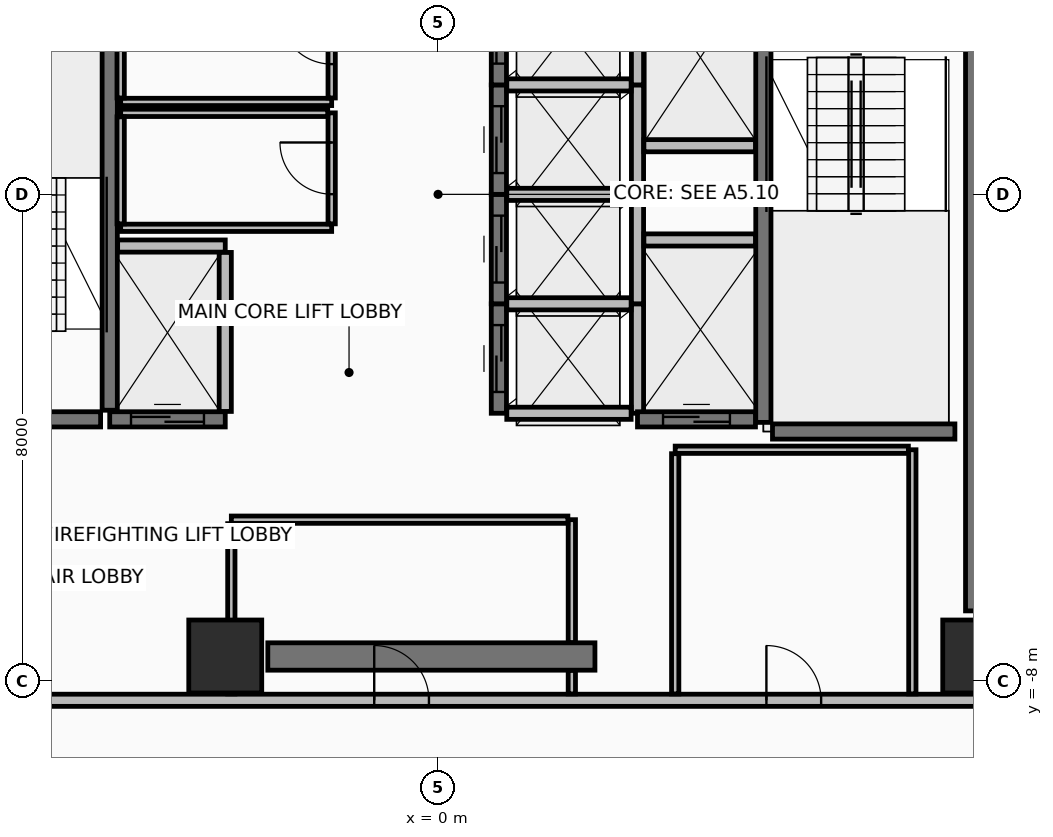
"""IFC4 building model, lengths in metres.
Left out: names, types, materials, properties, quantities, classifications, styles, units other than length and angle.
Written with IfcOpenShell. Run it as: python <this file> out.ifc"""

import sys

from ifc_helpers import new_model, si_unit, direction, frame, frame_2d, origin, origin_2d, place, context, subcontext, project, spatial, rectangle, extrude, element, fill, save


model = new_model("IFC4")
c1 = context("Model", 3, precision=1e-05, world=origin(), true_north=direction((0.0, 1.0)))
c2 = subcontext(c1, "Body", "Model", "MODEL_VIEW")
j1 = project(units=[si_unit("LENGTHUNIT", "METRE"), si_unit("PLANEANGLEUNIT", "RADIAN")], contexts=[c1])
p1 = place(None, origin())
s1 = spatial("IfcSite", under=j1, at=p1, CompositionType="ELEMENT")
p2 = place(p1, origin())
s2 = spatial("IfcBuilding", under=s1, at=p2, CompositionType="ELEMENT")
p3 = place(p2, frame((0.0, 0.0, 170.5)))
s3 = spatial("IfcBuildingStorey", under=s2, at=p3, CompositionType="ELEMENT", Elevation=170.5)
for number, where, z_axis, x_axis in (
    (1, (-3.5, -7.6, 0.0), (0.0, 0.0, 1.0), (1.0, 0.0, 0.0)),
    (2, (8.9, -7.6, 0.0), (0.0, 0.0, 1.0), (1.0, 0.0, 0.0)),
):
    element("IfcColumn", number, at=place(p3, frame(where, z_axis=z_axis, x_axis=x_axis)), inside=s3, PredefinedType="COLUMN", context=c2, shape_type="SweptSolid", body=[
        extrude(rectangle(XDim=1.2, YDim=1.2, at=origin_2d()), origin(), (0.0, 0.0, 1.0), 3.6),
    ])
p4 = place(p3, frame((-2.8, -7.6, 0.0), z_axis=(0.0, 0.0, 1.0), x_axis=(1.0, 0.0, 0.0)))
e3 = element("IfcWall", 3, at=p4, inside=s3, PredefinedType="SHEAR", context=c2, shape_type="SweptSolid", body=[
    extrude(rectangle(XDim=5.38, YDim=0.45, at=frame_2d((2.69, 0.0))), origin(), (0.0, 0.0, 1.0), 3.42),
])
p5 = place(p3, frame((8.9, -6.85, 0.0), z_axis=(0.0, 0.0, 1.0), x_axis=(0.0, 1.0, 0.0)))
e4 = element("IfcWall", 4, at=p5, inside=s3, PredefinedType="SHEAR", context=c2, shape_type="SweptSolid", body=[
    extrude(rectangle(XDim=10.7, YDim=0.45, at=frame_2d((5.35, 0.0))), origin(), (0.0, 0.0, 1.0), 3.42),
])
p6 = place(p3, frame((-9.62, -8.32, 0.0), z_axis=(0.0, 0.0, 1.0), x_axis=(1.0, 0.0, 0.0)))
e5 = element("IfcWall", 5, at=p6, inside=s3, PredefinedType="PARTITIONING", context=c2, shape_type="SweptSolid", body=[
    extrude(rectangle(XDim=19.24, YDim=0.2, at=frame_2d((9.62, 0.0))), origin(), (0.0, 0.0, 1.0), 2.865),
])
p7 = place(p6, frame((8.57, 0.0, 0.0)))
e6 = element("IfcOpeningElement", 6, at=p7, cuts=e5, PredefinedType="OPENING", context=c2, shape_type="SweptSolid", body=[
    extrude(rectangle(XDim=0.9, YDim=2.1, at=frame_2d((0.45, 1.05))), frame((0.0, 0.11, 0.0), z_axis=(0.0, -1.0, 0.0), x_axis=(1.0, 0.0, 0.0)), (0.0, 0.0, 1.0), 0.22),
])
p8 = place(p6, frame((15.02, 0.0, 0.0)))
e7 = element("IfcOpeningElement", 7, at=p8, cuts=e5, PredefinedType="OPENING", context=c2, shape_type="SweptSolid", body=[
    extrude(rectangle(XDim=0.9, YDim=2.1, at=frame_2d((0.45, 1.05))), frame((0.0, 0.11, 0.0), z_axis=(0.0, -1.0, 0.0), x_axis=(1.0, 0.0, 0.0)), (0.0, 0.0, 1.0), 0.22),
])
p9 = place(p3, frame((-5.4, -3.55, 0.0), z_axis=(0.0, 0.0, 1.0), x_axis=(0.0, 1.0, 0.0)))
e8 = element("IfcWall", 8, at=p9, inside=s3, PredefinedType="SHEAR", context=c2, shape_type="SweptSolid", body=[
    extrude(rectangle(XDim=7.3, YDim=0.25, at=frame_2d((3.65, 0.0))), origin(), (0.0, 0.0, 1.0), 3.42),
])
p10 = place(p3, frame((-8.5, -3.7, 0.0), z_axis=(0.0, 0.0, 1.0), x_axis=(1.0, 0.0, 0.0)))
e9 = element("IfcWall", 9, at=p10, inside=s3, PredefinedType="SHEAR", context=c2, shape_type="SweptSolid", body=[
    extrude(rectangle(XDim=2.95, YDim=0.25, at=frame_2d((1.475, 0.0))), origin(), (0.0, 0.0, 1.0), 3.42),
])
p11 = place(p10, frame((0.9, 0.0, 0.0)))
e10 = element("IfcOpeningElement", 10, at=p11, cuts=e9, PredefinedType="OPENING", context=c2, shape_type="SweptSolid", body=[
    extrude(rectangle(XDim=1.1, YDim=2.15, at=frame_2d((0.55, 1.075))), frame((0.0, 0.135, 0.0), z_axis=(0.0, -1.0, 0.0), x_axis=(1.0, 0.0, 0.0)), (0.0, 0.0, 1.0), 0.27),
])
p12 = place(p3, frame((5.35, -3.75, 0.0), z_axis=(0.0, 0.0, 1.0), x_axis=(0.0, 1.0, 0.0)))
e11 = element("IfcWall", 11, at=p12, inside=s3, PredefinedType="SHEAR", context=c2, shape_type="SweptSolid", body=[
    extrude(rectangle(XDim=7.3, YDim=0.25, at=frame_2d((3.65, 0.0))), origin(), (0.0, 0.0, 1.0), 3.42),
])
p13 = place(p3, frame((5.5, -3.9, 0.0), z_axis=(0.0, 0.0, 1.0), x_axis=(1.0, 0.0, 0.0)))
e12 = element("IfcWall", 12, at=p13, inside=s3, PredefinedType="SHEAR", context=c2, shape_type="SweptSolid", body=[
    extrude(rectangle(XDim=3.0, YDim=0.25, at=frame_2d((1.5, 0.0))), origin(), (0.0, 0.0, 1.0), 3.42),
])
p14 = place(p3, frame((1.0, -3.6, 0.0), z_axis=(0.0, 0.0, 1.0), x_axis=(0.0, 1.0, 0.0)))
e13 = element("IfcWall", 13, at=p14, inside=s3, PredefinedType="SHEAR", context=c2, shape_type="SweptSolid", body=[
    extrude(rectangle(XDim=1.8, YDim=0.25, at=frame_2d((0.9, 0.0))), origin(), (0.0, 0.0, 1.0), 3.42),
])
p15 = place(p14, frame((0.35, 0.0, 0.0)))
e14 = element("IfcOpeningElement", 14, at=p15, cuts=e13, PredefinedType="OPENING", context=c2, shape_type="SweptSolid", body=[
    extrude(rectangle(XDim=1.1, YDim=2.2, at=frame_2d((0.55, 1.1))), frame((0.0, 0.135, 0.0), z_axis=(0.0, -1.0, 0.0), x_axis=(1.0, 0.0, 0.0)), (0.0, 0.0, 1.0), 0.27),
])
p16 = place(p3, frame((3.28, -3.6, 0.0), z_axis=(0.0, 0.0, 1.0), x_axis=(0.0, 1.0, 0.0)))
e15 = element("IfcWall", 15, at=p16, inside=s3, PredefinedType="PARTITIONING", context=c2, shape_type="SweptSolid", body=[
    extrude(rectangle(XDim=1.8, YDim=0.2, at=frame_2d((0.9, 0.0))), origin(), (0.0, 0.0, 1.0), 3.42),
])
for number, where, z_axis, x_axis in (
    (16, (1.13, -3.6, 0.0), (0.0, 0.0, 1.0), (1.0, 0.0, 0.0)),
    (17, (1.13, -1.8, 0.0), (0.0, 0.0, 1.0), (1.0, 0.0, 0.0)),
):
    element("IfcWall", number, at=place(p3, frame(where, z_axis=z_axis, x_axis=x_axis)), inside=s3, PredefinedType="PARTITIONING", context=c2, shape_type="SweptSolid", body=[
        extrude(rectangle(XDim=2.045, YDim=0.2, at=frame_2d((1.022, 0.0))), origin(), (0.0, 0.0, 1.0), 3.42),
    ])
p17 = place(p3, frame((1.0, -1.8, 0.0), z_axis=(0.0, 0.0, 1.0), x_axis=(0.0, 1.0, 0.0)))
e18 = element("IfcWall", 18, at=p17, inside=s3, PredefinedType="SHEAR", context=c2, shape_type="SweptSolid", body=[
    extrude(rectangle(XDim=1.8, YDim=0.25, at=frame_2d((0.9, 0.0))), origin(), (0.0, 0.0, 1.0), 3.42),
])
p18 = place(p17, frame((0.35, 0.0, 0.0)))
e19 = element("IfcOpeningElement", 19, at=p18, cuts=e18, PredefinedType="OPENING", context=c2, shape_type="SweptSolid", body=[
    extrude(rectangle(XDim=1.1, YDim=2.2, at=frame_2d((0.55, 1.1))), frame((0.0, 0.135, 0.0), z_axis=(0.0, -1.0, 0.0), x_axis=(1.0, 0.0, 0.0)), (0.0, 0.0, 1.0), 0.27),
])
p19 = place(p3, frame((3.28, -1.8, 0.0), z_axis=(0.0, 0.0, 1.0), x_axis=(0.0, 1.0, 0.0)))
e20 = element("IfcWall", 20, at=p19, inside=s3, PredefinedType="PARTITIONING", context=c2, shape_type="SweptSolid", body=[
    extrude(rectangle(XDim=1.8, YDim=0.2, at=frame_2d((0.9, 0.0))), origin(), (0.0, 0.0, 1.0), 3.42),
])
p20 = place(p3, frame((1.13, 0.0, 0.0), z_axis=(0.0, 0.0, 1.0), x_axis=(1.0, 0.0, 0.0)))
e21 = element("IfcWall", 21, at=p20, inside=s3, PredefinedType="PARTITIONING", context=c2, shape_type="SweptSolid", body=[
    extrude(rectangle(XDim=2.045, YDim=0.2, at=frame_2d((1.022, 0.0))), origin(), (0.0, 0.0, 1.0), 3.42),
])
p21 = place(p3, frame((1.0, 0.0, 0.0), z_axis=(0.0, 0.0, 1.0), x_axis=(0.0, 1.0, 0.0)))
e22 = element("IfcWall", 22, at=p21, inside=s3, PredefinedType="SHEAR", context=c2, shape_type="SweptSolid", body=[
    extrude(rectangle(XDim=1.8, YDim=0.25, at=frame_2d((0.9, 0.0))), origin(), (0.0, 0.0, 1.0), 3.42),
])
p22 = place(p21, frame((0.35, 0.0, 0.0)))
e23 = element("IfcOpeningElement", 23, at=p22, cuts=e22, PredefinedType="OPENING", context=c2, shape_type="SweptSolid", body=[
    extrude(rectangle(XDim=1.1, YDim=2.2, at=frame_2d((0.55, 1.1))), frame((0.0, 0.135, 0.0), z_axis=(0.0, -1.0, 0.0), x_axis=(1.0, 0.0, 0.0)), (0.0, 0.0, 1.0), 0.27),
])
p23 = place(p3, frame((3.28, 0.0, 0.0), z_axis=(0.0, 0.0, 1.0), x_axis=(0.0, 1.0, 0.0)))
e24 = element("IfcWall", 24, at=p23, inside=s3, PredefinedType="PARTITIONING", context=c2, shape_type="SweptSolid", body=[
    extrude(rectangle(XDim=1.8, YDim=0.2, at=frame_2d((0.9, 0.0))), origin(), (0.0, 0.0, 1.0), 3.42),
])
p24 = place(p3, frame((1.13, 1.8, 0.0), z_axis=(0.0, 0.0, 1.0), x_axis=(1.0, 0.0, 0.0)))
e25 = element("IfcWall", 25, at=p24, inside=s3, PredefinedType="PARTITIONING", context=c2, shape_type="SweptSolid", body=[
    extrude(rectangle(XDim=2.045, YDim=0.2, at=frame_2d((1.022, 0.0))), origin(), (0.0, 0.0, 1.0), 3.42),
])
p25 = place(p3, frame((1.0, 1.8, 0.0), z_axis=(0.0, 0.0, 1.0), x_axis=(0.0, 1.0, 0.0)))
e26 = element("IfcWall", 26, at=p25, inside=s3, PredefinedType="SHEAR", context=c2, shape_type="SweptSolid", body=[
    extrude(rectangle(XDim=1.8, YDim=0.25, at=frame_2d((0.9, 0.0))), origin(), (0.0, 0.0, 1.0), 3.42),
])
p26 = place(p25, frame((0.35, 0.0, 0.0)))
e27 = element("IfcOpeningElement", 27, at=p26, cuts=e26, PredefinedType="OPENING", context=c2, shape_type="SweptSolid", body=[
    extrude(rectangle(XDim=1.1, YDim=2.2, at=frame_2d((0.55, 1.1))), frame((0.0, 0.135, 0.0), z_axis=(0.0, -1.0, 0.0), x_axis=(1.0, 0.0, 0.0)), (0.0, 0.0, 1.0), 0.27),
])
p27 = place(p3, frame((3.28, 1.8, 0.0), z_axis=(0.0, 0.0, 1.0), x_axis=(0.0, 1.0, 0.0)))
e28 = element("IfcWall", 28, at=p27, inside=s3, PredefinedType="PARTITIONING", context=c2, shape_type="SweptSolid", body=[
    extrude(rectangle(XDim=1.8, YDim=0.2, at=frame_2d((0.9, 0.0))), origin(), (0.0, 0.0, 1.0), 3.42),
])
p28 = place(p3, frame((-5.4, -3.7, 0.0), z_axis=(0.0, 0.0, 1.0), x_axis=(1.0, 0.0, 0.0)))
e29 = element("IfcWall", 29, at=p28, inside=s3, PredefinedType="SHEAR", context=c2, shape_type="SweptSolid", body=[
    extrude(rectangle(XDim=1.9, YDim=0.25, at=frame_2d((0.95, 0.0))), origin(), (0.0, 0.0, 1.0), 3.42),
])
p29 = place(p28, frame((0.35, 0.0, 0.0)))
e30 = element("IfcOpeningElement", 30, at=p29, cuts=e29, PredefinedType="OPENING", context=c2, shape_type="SweptSolid", body=[
    extrude(rectangle(XDim=1.2, YDim=2.2, at=frame_2d((0.6, 1.1))), frame((0.0, 0.135, 0.0), z_axis=(0.0, -1.0, 0.0), x_axis=(1.0, 0.0, 0.0)), (0.0, 0.0, 1.0), 0.27),
])
p30 = place(p3, frame((-5.27, -0.85, 0.0), z_axis=(0.0, 0.0, 1.0), x_axis=(1.0, 0.0, 0.0)))
e31 = element("IfcWall", 31, at=p30, inside=s3, PredefinedType="PARTITIONING", context=c2, shape_type="SweptSolid", body=[
    extrude(rectangle(XDim=1.77, YDim=0.2, at=frame_2d((0.885, 0.0))), origin(), (0.0, 0.0, 1.0), 3.42),
])
p31 = place(p3, frame((-3.5, -3.57, 0.0), z_axis=(0.0, 0.0, 1.0), x_axis=(0.0, 1.0, 0.0)))
e32 = element("IfcWall", 32, at=p31, inside=s3, PredefinedType="PARTITIONING", context=c2, shape_type="SweptSolid", body=[
    extrude(rectangle(XDim=2.615, YDim=0.2, at=frame_2d((1.308, 0.0))), origin(), (0.0, 0.0, 1.0), 3.42),
])
p32 = place(p3, frame((3.385, 0.8, 0.0), z_axis=(0.0, 0.0, 1.0), x_axis=(1.0, 0.0, 0.0)))
e33 = element("IfcWall", 33, at=p32, inside=s3, PredefinedType="PARTITIONING", context=c2, shape_type="SweptSolid", body=[
    extrude(rectangle(XDim=1.835, YDim=0.2, at=frame_2d((0.917, 0.0))), origin(), (0.0, 0.0, 1.0), 3.42),
])
p33 = place(p3, frame((3.28, -3.7, 0.0), z_axis=(0.0, 0.0, 1.0), x_axis=(1.0, 0.0, 0.0)))
e34 = element("IfcWall", 34, at=p33, inside=s3, PredefinedType="SHEAR", context=c2, shape_type="SweptSolid", body=[
    extrude(rectangle(XDim=1.94, YDim=0.25, at=frame_2d((0.97, 0.0))), origin(), (0.0, 0.0, 1.0), 3.42),
])
p34 = place(p33, frame((0.42, 0.0, 0.0)))
e35 = element("IfcOpeningElement", 35, at=p34, cuts=e34, PredefinedType="OPENING", context=c2, shape_type="SweptSolid", body=[
    extrude(rectangle(XDim=1.1, YDim=2.2, at=frame_2d((0.55, 1.1))), frame((0.0, 0.135, 0.0), z_axis=(0.0, -1.0, 0.0), x_axis=(1.0, 0.0, 0.0)), (0.0, 0.0, 1.0), 0.27),
])
p35 = place(p3, frame((3.385, -0.75, 0.0), z_axis=(0.0, 0.0, 1.0), x_axis=(1.0, 0.0, 0.0)))
e36 = element("IfcWall", 36, at=p35, inside=s3, PredefinedType="PARTITIONING", context=c2, shape_type="SweptSolid", body=[
    extrude(rectangle(XDim=1.835, YDim=0.2, at=frame_2d((0.917, 0.0))), origin(), (0.0, 0.0, 1.0), 3.42),
])
p36 = place(p3, frame((-5.22, 1.52, 0.0), z_axis=(0.0, 0.0, 1.0), x_axis=(1.0, 0.0, 0.0)))
e37 = element("IfcWall", 37, at=p36, inside=s3, PredefinedType="PARTITIONING", context=c2, shape_type="SweptSolid", body=[
    extrude(rectangle(XDim=3.47, YDim=0.12, at=frame_2d((1.735, 0.0))), origin(), (0.0, 0.0, 1.0), 3.42),
])
p37 = place(p3, frame((-1.75, 1.585, 0.0), z_axis=(0.0, 0.0, 1.0), x_axis=(0.0, 1.0, 0.0)))
e38 = element("IfcWall", 38, at=p37, inside=s3, PredefinedType="PARTITIONING", context=c2, shape_type="SweptSolid", body=[
    extrude(rectangle(XDim=1.965, YDim=0.12, at=frame_2d((0.982, 0.0))), origin(), (0.0, 0.0, 1.0), 3.42),
])
p38 = place(p37, frame((0.557, 0.0, 0.0)))
e39 = element("IfcOpeningElement", 39, at=p38, cuts=e38, PredefinedType="OPENING", context=c2, shape_type="SweptSolid", body=[
    extrude(rectangle(XDim=0.85, YDim=2.1, at=frame_2d((0.425, 1.05))), frame((0.0, 0.07, 0.0), z_axis=(0.0, -1.0, 0.0), x_axis=(1.0, 0.0, 0.0)), (0.0, 0.0, 1.0), 0.14),
])
p39 = place(p3, frame((-5.22, 3.485, 0.0), z_axis=(0.0, 0.0, 1.0), x_axis=(0.0, -1.0, 0.0)))
e40 = element("IfcWall", 40, at=p39, inside=s3, PredefinedType="PARTITIONING", context=c2, shape_type="SweptSolid", body=[
    extrude(rectangle(XDim=1.9, YDim=0.12, at=frame_2d((0.95, 0.0))), origin(), (0.0, 0.0, 1.0), 3.42),
])
p40 = place(p3, frame((-5.22, -0.55, 0.0), z_axis=(0.0, 0.0, 1.0), x_axis=(1.0, 0.0, 0.0)))
e41 = element("IfcWall", 41, at=p40, inside=s3, PredefinedType="PARTITIONING", context=c2, shape_type="SweptSolid", body=[
    extrude(rectangle(XDim=3.47, YDim=0.12, at=frame_2d((1.735, 0.0))), origin(), (0.0, 0.0, 1.0), 3.42),
])
p41 = place(p3, frame((-1.75, -0.485, 0.0), z_axis=(0.0, 0.0, 1.0), x_axis=(0.0, 1.0, 0.0)))
e42 = element("IfcWall", 42, at=p41, inside=s3, PredefinedType="PARTITIONING", context=c2, shape_type="SweptSolid", body=[
    extrude(rectangle(XDim=1.825, YDim=0.12, at=frame_2d((0.913, 0.0))), origin(), (0.0, 0.0, 1.0), 3.42),
])
p42 = place(p41, frame((0.488, 0.0, 0.0)))
e43 = element("IfcOpeningElement", 43, at=p42, cuts=e42, PredefinedType="OPENING", context=c2, shape_type="SweptSolid", body=[
    extrude(rectangle(XDim=0.85, YDim=2.1, at=frame_2d((0.425, 1.05))), frame((0.0, 0.07, 0.0), z_axis=(0.0, -1.0, 0.0), x_axis=(1.0, 0.0, 0.0)), (0.0, 0.0, 1.0), 0.14),
])
p43 = place(p3, frame((-1.815, 1.34, 0.0), z_axis=(0.0, 0.0, 1.0), x_axis=(-1.0, 0.0, 0.0)))
e44 = element("IfcWall", 44, at=p43, inside=s3, PredefinedType="PARTITIONING", context=c2, shape_type="SweptSolid", body=[
    extrude(rectangle(XDim=3.405, YDim=0.12, at=frame_2d((1.703, 0.0))), origin(), (0.0, 0.0, 1.0), 3.42),
])
p44 = place(p3, frame((-5.22, 1.275, 0.0), z_axis=(0.0, 0.0, 1.0), x_axis=(0.0, -1.0, 0.0)))
e45 = element("IfcWall", 45, at=p44, inside=s3, PredefinedType="PARTITIONING", context=c2, shape_type="SweptSolid", body=[
    extrude(rectangle(XDim=1.76, YDim=0.12, at=frame_2d((0.88, 0.0))), origin(), (0.0, 0.0, 1.0), 3.42),
])
p45 = place(p3, frame((2.2, -8.215, 0.0), z_axis=(0.0, 0.0, 1.0), x_axis=(0.0, 1.0, 0.0)))
e46 = element("IfcWall", 46, at=p45, inside=s3, PredefinedType="PARTITIONING", context=c2, shape_type="SweptSolid", body=[
    extrude(rectangle(XDim=0.385, YDim=0.12, at=frame_2d((0.192, 0.0))), origin(), (0.0, 0.0, 1.0), 2.715),
])
p46 = place(p3, frame((2.2, -7.37, 0.0), z_axis=(0.0, 0.0, 1.0), x_axis=(0.0, 1.0, 0.0)))
e47 = element("IfcWall", 47, at=p46, inside=s3, PredefinedType="PARTITIONING", context=c2, shape_type="SweptSolid", body=[
    extrude(rectangle(XDim=2.02, YDim=0.12, at=frame_2d((1.01, 0.0))), origin(), (0.0, 0.0, 1.0), 2.715),
])
p47 = place(p3, frame((2.135, -5.35, 0.0), z_axis=(0.0, 0.0, 1.0), x_axis=(-1.0, 0.0, 0.0)))
e48 = element("IfcWall", 48, at=p47, inside=s3, PredefinedType="PARTITIONING", context=c2, shape_type="SweptSolid", body=[
    extrude(rectangle(XDim=5.535, YDim=0.12, at=frame_2d((2.768, 0.0))), origin(), (0.0, 0.0, 1.0), 2.715),
])
p48 = place(p3, frame((-3.4, -5.415, 0.0), z_axis=(0.0, 0.0, 1.0), x_axis=(0.0, -1.0, 0.0)))
e49 = element("IfcWall", 49, at=p48, inside=s3, PredefinedType="PARTITIONING", context=c2, shape_type="SweptSolid", body=[
    extrude(rectangle(XDim=2.8, YDim=0.12, at=frame_2d((1.4, 0.0))), origin(), (0.0, 0.0, 1.0), 2.715),
])
p49 = place(p3, frame((7.8, -8.215, 0.0), z_axis=(0.0, 0.0, 1.0), x_axis=(0.0, 1.0, 0.0)))
e50 = element("IfcWall", 50, at=p49, inside=s3, PredefinedType="PARTITIONING", context=c2, shape_type="SweptSolid", body=[
    extrude(rectangle(XDim=4.015, YDim=0.12, at=frame_2d((2.008, 0.0))), origin(), (0.0, 0.0, 1.0), 2.715),
])
p50 = place(p3, frame((7.735, -4.2, 0.0), z_axis=(0.0, 0.0, 1.0), x_axis=(-1.0, 0.0, 0.0)))
e51 = element("IfcWall", 51, at=p50, inside=s3, PredefinedType="PARTITIONING", context=c2, shape_type="SweptSolid", body=[
    extrude(rectangle(XDim=3.835, YDim=0.12, at=frame_2d((1.917, 0.0))), origin(), (0.0, 0.0, 1.0), 3.42),
])
p51 = place(p3, frame((3.9, -4.265, 0.0), z_axis=(0.0, 0.0, 1.0), x_axis=(0.0, -1.0, 0.0)))
e52 = element("IfcWall", 52, at=p51, inside=s3, PredefinedType="PARTITIONING", context=c2, shape_type="SweptSolid", body=[
    extrude(rectangle(XDim=3.95, YDim=0.12, at=frame_2d((1.975, 0.0))), origin(), (0.0, 0.0, 1.0), 2.715),
])
p52 = place(p15, origin())
e53 = element("IfcDoor", 53, at=p52, inside=s3, OperationType="SLIDING_TO_LEFT", PredefinedType="DOOR", context=c2, shape_type="SweptSolid", body=[
    extrude(rectangle(XDim=1.1, YDim=2.2, at=frame_2d((0.55, 1.1))), frame((0.0, 0.025, 0.0), z_axis=(0.0, -1.0, 0.0), x_axis=(1.0, 0.0, 0.0)), (0.0, 0.0, 1.0), 0.05),
])
fill(e14, e53)
p53 = place(p18, origin())
e54 = element("IfcDoor", 54, at=p53, inside=s3, OperationType="SLIDING_TO_LEFT", PredefinedType="DOOR", context=c2, shape_type="SweptSolid", body=[
    extrude(rectangle(XDim=1.1, YDim=2.2, at=frame_2d((0.55, 1.1))), frame((0.0, 0.025, 0.0), z_axis=(0.0, -1.0, 0.0), x_axis=(1.0, 0.0, 0.0)), (0.0, 0.0, 1.0), 0.05),
])
fill(e19, e54)
p54 = place(p22, origin())
e55 = element("IfcDoor", 55, at=p54, inside=s3, OperationType="SLIDING_TO_LEFT", PredefinedType="DOOR", context=c2, shape_type="SweptSolid", body=[
    extrude(rectangle(XDim=1.1, YDim=2.2, at=frame_2d((0.55, 1.1))), frame((0.0, 0.025, 0.0), z_axis=(0.0, -1.0, 0.0), x_axis=(1.0, 0.0, 0.0)), (0.0, 0.0, 1.0), 0.05),
])
fill(e23, e55)
p55 = place(p26, origin())
e56 = element("IfcDoor", 56, at=p55, inside=s3, OperationType="SLIDING_TO_LEFT", PredefinedType="DOOR", context=c2, shape_type="SweptSolid", body=[
    extrude(rectangle(XDim=1.1, YDim=2.2, at=frame_2d((0.55, 1.1))), frame((0.0, 0.025, 0.0), z_axis=(0.0, -1.0, 0.0), x_axis=(1.0, 0.0, 0.0)), (0.0, 0.0, 1.0), 0.05),
])
fill(e27, e56)
p56 = place(p29, origin())
e57 = element("IfcDoor", 57, at=p56, inside=s3, OperationType="SLIDING_TO_RIGHT", PredefinedType="DOOR", context=c2, shape_type="SweptSolid", body=[
    extrude(rectangle(XDim=1.2, YDim=2.2, at=frame_2d((0.6, 1.1))), frame((0.0, 0.025, 0.0), z_axis=(0.0, -1.0, 0.0), x_axis=(1.0, 0.0, 0.0)), (0.0, 0.0, 1.0), 0.05),
])
fill(e30, e57)
p57 = place(p34, origin())
e58 = element("IfcDoor", 58, at=p57, inside=s3, OperationType="SLIDING_TO_LEFT", PredefinedType="DOOR", context=c2, shape_type="SweptSolid", body=[
    extrude(rectangle(XDim=1.1, YDim=2.2, at=frame_2d((0.55, 1.1))), frame((0.0, 0.025, 0.0), z_axis=(0.0, -1.0, 0.0), x_axis=(1.0, 0.0, 0.0)), (0.0, 0.0, 1.0), 0.05),
])
fill(e35, e58)
p58 = place(p38, frame((0.85, 0.0, 0.0), z_axis=(0.0, 0.0, 1.0), x_axis=(-1.0, 0.0, 0.0)))
e59 = element("IfcDoor", 59, at=p58, inside=s3, OperationType="SINGLE_SWING_RIGHT", PredefinedType="DOOR", context=c2, shape_type="SweptSolid", body=[
    extrude(rectangle(XDim=0.85, YDim=2.1, at=frame_2d((0.425, 1.05))), frame((0.0, 0.025, 0.0), z_axis=(0.0, -1.0, 0.0), x_axis=(1.0, 0.0, 0.0)), (0.0, 0.0, 1.0), 0.05),
])
fill(e39, e59)
p59 = place(p42, frame((0.85, 0.0, 0.0), z_axis=(0.0, 0.0, 1.0), x_axis=(-1.0, 0.0, 0.0)))
e60 = element("IfcDoor", 60, at=p59, inside=s3, OperationType="SINGLE_SWING_RIGHT", PredefinedType="DOOR", context=c2, shape_type="SweptSolid", body=[
    extrude(rectangle(XDim=0.85, YDim=2.1, at=frame_2d((0.425, 1.05))), frame((0.0, 0.025, 0.0), z_axis=(0.0, -1.0, 0.0), x_axis=(1.0, 0.0, 0.0)), (0.0, 0.0, 1.0), 0.05),
])
fill(e43, e60)
p60 = place(p7, origin())
e61 = element("IfcDoor", 61, at=p60, inside=s3, OperationType="SINGLE_SWING_LEFT", PredefinedType="DOOR", context=c2, shape_type="SweptSolid", body=[
    extrude(rectangle(XDim=0.9, YDim=2.1, at=frame_2d((0.45, 1.05))), frame((0.0, 0.025, 0.0), z_axis=(0.0, -1.0, 0.0), x_axis=(1.0, 0.0, 0.0)), (0.0, 0.0, 1.0), 0.05),
])
fill(e6, e61)
p61 = place(p8, origin())
e62 = element("IfcDoor", 62, at=p61, inside=s3, OperationType="SINGLE_SWING_LEFT", PredefinedType="DOOR", context=c2, shape_type="SweptSolid", body=[
    extrude(rectangle(XDim=0.9, YDim=2.1, at=frame_2d((0.45, 1.05))), frame((0.0, 0.025, 0.0), z_axis=(0.0, -1.0, 0.0), x_axis=(1.0, 0.0, 0.0)), (0.0, 0.0, 1.0), 0.05),
])
fill(e7, e62)
save(model, sys.argv[1])
